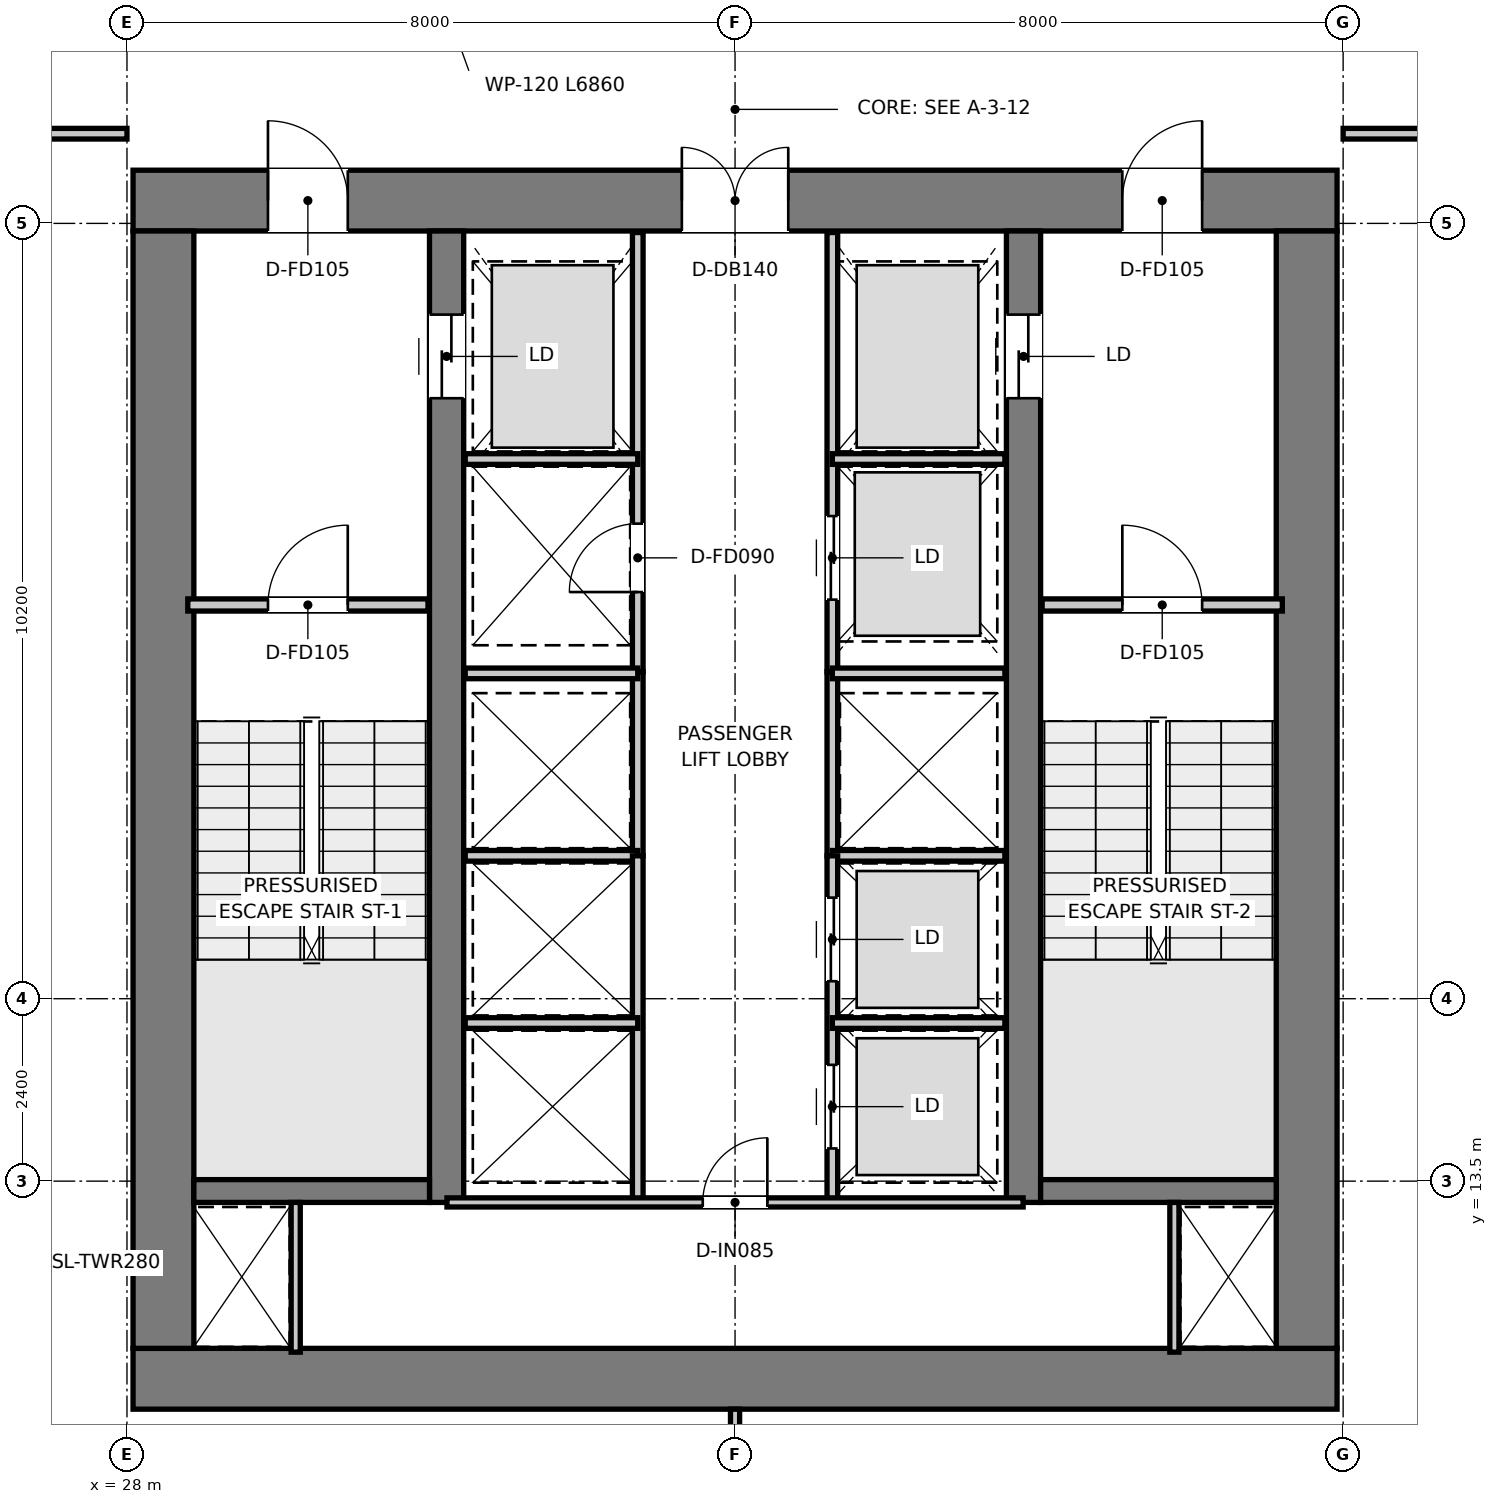
"""IFC4 building model, lengths in metres.
Left out: names, types, materials, properties, quantities, classifications, styles, units other than length and angle.
Written with IfcOpenShell. Run it as: python <this file> out.ifc"""

import sys

from ifc_helpers import new_model, si_unit, direction, frame, frame_2d, origin, place, context, subcontext, project, spatial, rectangle, extrude, element, fill, save


model = new_model("IFC4")
c1 = context("Model", 3, precision=1e-05, world=origin(), true_north=direction((0.0, 1.0)))
c2 = subcontext(c1, "Body", "Model", "MODEL_VIEW")
j1 = project(units=[si_unit("LENGTHUNIT", "METRE"), si_unit("PLANEANGLEUNIT", "RADIAN")], contexts=[c1])
p1 = place(None, origin())
s1 = spatial("IfcSite", under=j1, at=p1, CompositionType="ELEMENT")
p2 = place(p1, origin())
s2 = spatial("IfcBuilding", under=s1, at=p2, CompositionType="ELEMENT")
p3 = place(p2, frame((0.0, 0.0, 146.2)))
s3 = spatial("IfcBuildingStorey", under=s2, at=p3, CompositionType="ELEMENT", Elevation=146.2)
p4 = place(p3, frame((28.08, 10.9, 0.0), z_axis=(0.0, 0.0, 1.0), x_axis=(1.0, 0.0, 0.0)))
e1 = element("IfcWall", 1, at=p4, inside=s3, PredefinedType="SHEAR", context=c2, shape_type="SweptSolid", body=[
    extrude(rectangle(XDim=15.84, YDim=0.8, at=frame_2d((7.92, 0.0))), origin(), (0.0, 0.0, 1.0), 3.95),
])
p5 = place(p3, frame((28.08, 26.4, 0.0), z_axis=(0.0, 0.0, 1.0), x_axis=(1.0, 0.0, 0.0)))
e2 = element("IfcWall", 2, at=p5, inside=s3, PredefinedType="SHEAR", context=c2, shape_type="SweptSolid", body=[
    extrude(rectangle(XDim=15.84, YDim=0.8, at=frame_2d((7.92, 0.0))), origin(), (0.0, 0.0, 1.0), 3.95),
])
p6 = place(p5, frame((7.22, 0.0, 0.0)))
e3 = element("IfcOpeningElement", 3, at=p6, cuts=e2, PredefinedType="OPENING", context=c2, shape_type="SweptSolid", body=[
    extrude(rectangle(XDim=1.4, YDim=2.2, at=frame_2d((0.7, 1.1))), frame((0.0, 0.41, 0.0), z_axis=(0.0, -1.0, 0.0), x_axis=(1.0, 0.0, 0.0)), (0.0, 0.0, 1.0), 0.82),
])
p7 = place(p5, frame((1.775, 0.0, 0.0)))
e4 = element("IfcOpeningElement", 4, at=p7, cuts=e2, PredefinedType="OPENING", context=c2, shape_type="SweptSolid", body=[
    extrude(rectangle(XDim=1.05, YDim=2.1, at=frame_2d((0.525, 1.05))), frame((0.0, 0.41, 0.0), z_axis=(0.0, -1.0, 0.0), x_axis=(1.0, 0.0, 0.0)), (0.0, 0.0, 1.0), 0.82),
])
p8 = place(p5, frame((13.015, 0.0, 0.0)))
e5 = element("IfcOpeningElement", 5, at=p8, cuts=e2, PredefinedType="OPENING", context=c2, shape_type="SweptSolid", body=[
    extrude(rectangle(XDim=1.05, YDim=2.1, at=frame_2d((0.525, 1.05))), frame((0.0, 0.41, 0.0), z_axis=(0.0, -1.0, 0.0), x_axis=(1.0, 0.0, 0.0)), (0.0, 0.0, 1.0), 0.82),
])
for number, where, z_axis, x_axis in (
    (6, (28.48, 11.3, 0.0), (0.0, 0.0, 1.0), (0.0, 1.0, 0.0)),
    (7, (43.52, 11.3, 0.0), (0.0, 0.0, 1.0), (0.0, 1.0, 0.0)),
):
    element("IfcWall", number, at=place(p3, frame(where, z_axis=z_axis, x_axis=x_axis)), inside=s3, PredefinedType="SHEAR", context=c2, shape_type="SweptSolid", body=[
        extrude(rectangle(XDim=14.7, YDim=0.8, at=frame_2d((7.35, 0.0))), origin(), (0.0, 0.0, 1.0), 3.95),
    ])
p9 = place(p3, frame((32.205, 13.22, 0.0), z_axis=(0.0, 0.0, 1.0), x_axis=(0.0, 1.0, 0.0)))
e8 = element("IfcWall", 8, at=p9, inside=s3, PredefinedType="SHEAR", context=c2, shape_type="SweptSolid", body=[
    extrude(rectangle(XDim=12.78, YDim=0.45, at=frame_2d((6.39, 0.0))), origin(), (0.0, 0.0, 1.0), 3.95),
])
p10 = place(p9, frame((10.58, 0.0, 0.0)))
e9 = element("IfcOpeningElement", 9, at=p10, cuts=e8, PredefinedType="OPENING", context=c2, shape_type="SweptSolid", body=[
    extrude(rectangle(XDim=1.1, YDim=2.15, at=frame_2d((0.55, 1.075))), frame((0.0, 0.235, 0.0), z_axis=(0.0, -1.0, 0.0), x_axis=(1.0, 0.0, 0.0)), (0.0, 0.0, 1.0), 0.47),
])
p11 = place(p3, frame((39.795, 13.22, 0.0), z_axis=(0.0, 0.0, 1.0), x_axis=(0.0, 1.0, 0.0)))
e10 = element("IfcWall", 10, at=p11, inside=s3, PredefinedType="SHEAR", context=c2, shape_type="SweptSolid", body=[
    extrude(rectangle(XDim=12.78, YDim=0.45, at=frame_2d((6.39, 0.0))), origin(), (0.0, 0.0, 1.0), 3.95),
])
p12 = place(p11, frame((10.58, 0.0, 0.0)))
e11 = element("IfcOpeningElement", 11, at=p12, cuts=e10, PredefinedType="OPENING", context=c2, shape_type="SweptSolid", body=[
    extrude(rectangle(XDim=1.1, YDim=2.15, at=frame_2d((0.55, 1.075))), frame((0.0, 0.235, 0.0), z_axis=(0.0, -1.0, 0.0), x_axis=(1.0, 0.0, 0.0)), (0.0, 0.0, 1.0), 0.47),
])
for number, where, z_axis, x_axis in (
    (12, (28.88, 13.37, 0.0), (0.0, 0.0, 1.0), (1.0, 0.0, 0.0)),
    (13, (40.02, 13.37, 0.0), (0.0, 0.0, 1.0), (1.0, 0.0, 0.0)),
):
    element("IfcWall", number, at=place(p3, frame(where, z_axis=z_axis, x_axis=x_axis)), inside=s3, PredefinedType="SHEAR", context=c2, shape_type="SweptSolid", body=[
        extrude(rectangle(XDim=3.1, YDim=0.3, at=frame_2d((1.55, 0.0))), origin(), (0.0, 0.0, 1.0), 3.95),
    ])
p13 = place(p3, frame((28.8, 21.08, 0.0), z_axis=(0.0, 0.0, 1.0), x_axis=(1.0, 0.0, 0.0)))
e14 = element("IfcWall", 14, at=p13, inside=s3, PredefinedType="PARTITIONING", context=c2, shape_type="SweptSolid", body=[
    extrude(rectangle(XDim=3.16, YDim=0.16, at=frame_2d((1.58, 0.0))), origin(), (0.0, 0.0, 1.0), 3.67),
])
p14 = place(p13, frame((1.055, 0.0, 0.0)))
e15 = element("IfcOpeningElement", 15, at=p14, cuts=e14, PredefinedType="OPENING", context=c2, shape_type="SweptSolid", body=[
    extrude(rectangle(XDim=1.05, YDim=2.1, at=frame_2d((0.525, 1.05))), frame((0.0, 0.09, 0.0), z_axis=(0.0, -1.0, 0.0), x_axis=(1.0, 0.0, 0.0)), (0.0, 0.0, 1.0), 0.18),
])
p15 = place(p3, frame((40.04, 21.08, 0.0), z_axis=(0.0, 0.0, 1.0), x_axis=(1.0, 0.0, 0.0)))
e16 = element("IfcWall", 16, at=p15, inside=s3, PredefinedType="PARTITIONING", context=c2, shape_type="SweptSolid", body=[
    extrude(rectangle(XDim=3.16, YDim=0.16, at=frame_2d((1.58, 0.0))), origin(), (0.0, 0.0, 1.0), 3.67),
])
p16 = place(p15, frame((1.055, 0.0, 0.0)))
e17 = element("IfcOpeningElement", 17, at=p16, cuts=e16, PredefinedType="OPENING", context=c2, shape_type="SweptSolid", body=[
    extrude(rectangle(XDim=1.05, YDim=2.1, at=frame_2d((0.525, 1.05))), frame((0.0, 0.09, 0.0), z_axis=(0.0, -1.0, 0.0), x_axis=(1.0, 0.0, 0.0)), (0.0, 0.0, 1.0), 0.18),
])
p17 = place(p3, frame((34.72, 20.2, 0.0), z_axis=(0.0, 0.0, 1.0), x_axis=(0.0, 1.0, 0.0)))
e18 = element("IfcWall", 18, at=p17, inside=s3, PredefinedType="PARTITIONING", context=c2, shape_type="SweptSolid", body=[
    extrude(rectangle(XDim=5.78, YDim=0.14, at=frame_2d((2.89, 0.0))), origin(), (0.0, 0.0, 1.0), 2.67),
])
p18 = place(p17, frame((1.05, 0.0, 0.0)))
e19 = element("IfcOpeningElement", 19, at=p18, cuts=e18, PredefinedType="OPENING", context=c2, shape_type="SweptSolid", body=[
    extrude(rectangle(XDim=0.9, YDim=2.1, at=frame_2d((0.45, 1.05))), frame((0.0, 0.08, 0.0), z_axis=(0.0, -1.0, 0.0), x_axis=(1.0, 0.0, 0.0)), (0.0, 0.0, 1.0), 0.16),
])
p19 = place(p3, frame((37.28, 20.2, 0.0), z_axis=(0.0, 0.0, 1.0), x_axis=(0.0, 1.0, 0.0)))
e20 = element("IfcWall", 20, at=p19, inside=s3, PredefinedType="PARTITIONING", context=c2, shape_type="SweptSolid", body=[
    extrude(rectangle(XDim=5.78, YDim=0.14, at=frame_2d((2.89, 0.0))), origin(), (0.0, 0.0, 1.0), 2.67),
])
p20 = place(p19, frame((0.95, 0.0, 0.0)))
e21 = element("IfcOpeningElement", 21, at=p20, cuts=e20, PredefinedType="OPENING", context=c2, shape_type="SweptSolid", body=[
    extrude(rectangle(XDim=1.1, YDim=2.15, at=frame_2d((0.55, 1.075))), frame((0.0, 0.08, 0.0), z_axis=(0.0, -1.0, 0.0), x_axis=(1.0, 0.0, 0.0)), (0.0, 0.0, 1.0), 0.16),
])
for number, where, z_axis, x_axis in (
    (22, (32.45, 23.0, 0.0), (0.0, 0.0, 1.0), (1.0, 0.0, 0.0)),
    (23, (37.28, 23.0, 0.0), (0.0, 0.0, 1.0), (1.0, 0.0, 0.0)),
):
    element("IfcWall", number, at=place(p3, frame(where, z_axis=z_axis, x_axis=x_axis)), inside=s3, PredefinedType="PARTITIONING", context=c2, shape_type="SweptSolid", body=[
        extrude(rectangle(XDim=2.27, YDim=0.14, at=frame_2d((1.135, 0.0))), origin(), (0.0, 0.0, 1.0), 2.67),
    ])
for number, where, z_axis, x_axis in (
    (24, (34.72, 17.78, 0.0), (0.0, 0.0, 1.0), (0.0, 1.0, 0.0)),
    (25, (37.28, 17.78, 0.0), (0.0, 0.0, 1.0), (0.0, 1.0, 0.0)),
):
    element("IfcWall", number, at=place(p3, frame(where, z_axis=z_axis, x_axis=x_axis)), inside=s3, PredefinedType="PARTITIONING", context=c2, shape_type="SweptSolid", body=[
        extrude(rectangle(XDim=2.42, YDim=0.14, at=frame_2d((1.21, 0.0))), origin(), (0.0, 0.0, 1.0), 3.67),
    ])
for number, where, z_axis, x_axis in (
    (26, (32.45, 17.78, 0.0), (0.0, 0.0, 1.0), (1.0, 0.0, 0.0)),
    (27, (32.45, 20.18, 0.0), (0.0, 0.0, 1.0), (1.0, 0.0, 0.0)),
    (28, (37.28, 17.78, 0.0), (0.0, 0.0, 1.0), (1.0, 0.0, 0.0)),
    (29, (37.28, 20.18, 0.0), (0.0, 0.0, 1.0), (1.0, 0.0, 0.0)),
):
    element("IfcWall", number, at=place(p3, frame(where, z_axis=z_axis, x_axis=x_axis)), inside=s3, PredefinedType="PARTITIONING", context=c2, shape_type="SweptSolid", body=[
        extrude(rectangle(XDim=2.27, YDim=0.14, at=frame_2d((1.135, 0.0))), origin(), (0.0, 0.0, 1.0), 3.67),
    ])
p21 = place(p3, frame((34.72, 13.22, 0.0), z_axis=(0.0, 0.0, 1.0), x_axis=(0.0, 1.0, 0.0)))
e30 = element("IfcWall", 30, at=p21, inside=s3, PredefinedType="PARTITIONING", context=c2, shape_type="SweptSolid", body=[
    extrude(rectangle(XDim=4.56, YDim=0.14, at=frame_2d((2.28, 0.0))), origin(), (0.0, 0.0, 1.0), 3.67),
])
p22 = place(p3, frame((32.45, 15.58, 0.0), z_axis=(0.0, 0.0, 1.0), x_axis=(1.0, 0.0, 0.0)))
e31 = element("IfcWall", 31, at=p22, inside=s3, PredefinedType="PARTITIONING", context=c2, shape_type="SweptSolid", body=[
    extrude(rectangle(XDim=2.27, YDim=0.14, at=frame_2d((1.135, 0.0))), origin(), (0.0, 0.0, 1.0), 3.67),
])
p23 = place(p3, frame((37.28, 13.22, 0.0), z_axis=(0.0, 0.0, 1.0), x_axis=(0.0, 1.0, 0.0)))
e32 = element("IfcWall", 32, at=p23, inside=s3, PredefinedType="PARTITIONING", context=c2, shape_type="SweptSolid", body=[
    extrude(rectangle(XDim=4.56, YDim=0.14, at=frame_2d((2.28, 0.0))), origin(), (0.0, 0.0, 1.0), 3.67),
])
p24 = place(p23, frame((0.71, 0.0, 0.0)))
e33 = element("IfcOpeningElement", 33, at=p24, cuts=e32, PredefinedType="OPENING", context=c2, shape_type="SweptSolid", body=[
    extrude(rectangle(XDim=1.1, YDim=2.15, at=frame_2d((0.55, 1.075))), frame((0.0, 0.08, 0.0), z_axis=(0.0, -1.0, 0.0), x_axis=(1.0, 0.0, 0.0)), (0.0, 0.0, 1.0), 0.16),
])
p25 = place(p23, frame((2.91, 0.0, 0.0)))
e34 = element("IfcOpeningElement", 34, at=p25, cuts=e32, PredefinedType="OPENING", context=c2, shape_type="SweptSolid", body=[
    extrude(rectangle(XDim=1.1, YDim=2.15, at=frame_2d((0.55, 1.075))), frame((0.0, 0.08, 0.0), z_axis=(0.0, -1.0, 0.0), x_axis=(1.0, 0.0, 0.0)), (0.0, 0.0, 1.0), 0.16),
])
p26 = place(p3, frame((37.28, 15.58, 0.0), z_axis=(0.0, 0.0, 1.0), x_axis=(1.0, 0.0, 0.0)))
e35 = element("IfcWall", 35, at=p26, inside=s3, PredefinedType="PARTITIONING", context=c2, shape_type="SweptSolid", body=[
    extrude(rectangle(XDim=2.27, YDim=0.14, at=frame_2d((1.135, 0.0))), origin(), (0.0, 0.0, 1.0), 3.67),
])
for number, where, z_axis, x_axis in (
    (36, (30.22, 11.25, 0.0), (0.0, 0.0, 1.0), (0.0, 1.0, 0.0)),
    (37, (41.78, 11.25, 0.0), (0.0, 0.0, 1.0), (0.0, 1.0, 0.0)),
):
    element("IfcWall", number, at=place(p3, frame(where, z_axis=z_axis, x_axis=x_axis)), inside=s3, PredefinedType="PARTITIONING", context=c2, shape_type="SweptSolid", body=[
        extrude(rectangle(XDim=1.97, YDim=0.12, at=frame_2d((0.985, 0.0))), origin(), (0.0, 0.0, 1.0), 3.67),
    ])
p27 = place(p3, frame((32.21, 13.22, 0.0), z_axis=(0.0, 0.0, 1.0), x_axis=(1.0, 0.0, 0.0)))
e38 = element("IfcWall", 38, at=p27, inside=s3, PredefinedType="PARTITIONING", context=c2, shape_type="SweptSolid", body=[
    extrude(rectangle(XDim=7.58, YDim=0.12, at=frame_2d((3.79, 0.0))), origin(), (0.0, 0.0, 1.0), 3.67),
])
p28 = place(p27, frame((3.365, 0.0, 0.0)))
e39 = element("IfcOpeningElement", 39, at=p28, cuts=e38, PredefinedType="OPENING", context=c2, shape_type="SweptSolid", body=[
    extrude(rectangle(XDim=0.85, YDim=2.1, at=frame_2d((0.425, 1.05))), frame((0.0, 0.07, 0.0), z_axis=(0.0, -1.0, 0.0), x_axis=(1.0, 0.0, 0.0)), (0.0, 0.0, 1.0), 0.14),
])
p29 = place(p3, frame((12.113, 27.28, 0.0), z_axis=(0.0, 0.0, 1.0), x_axis=(1.0, 0.0, 0.0)))
e40 = element("IfcWall", 40, at=p29, inside=s3, PredefinedType="PARTITIONING", context=c2, shape_type="SweptSolid", body=[
    extrude(rectangle(XDim=15.887, YDim=0.14, at=frame_2d((7.944, 0.0))), origin(), (0.0, 0.0, 1.0), 3.03),
])
p30 = place(p29, frame((4.105, 0.0, 0.0)))
e41 = element("IfcOpeningElement", 41, at=p30, cuts=e40, PredefinedType="OPENING", context=c2, shape_type="SweptSolid", body=[
    extrude(rectangle(XDim=0.9, YDim=2.1, at=frame_2d((0.45, 1.05))), frame((0.0, 0.08, 0.0), z_axis=(0.0, -1.0, 0.0), x_axis=(1.0, 0.0, 0.0)), (0.0, 0.0, 1.0), 0.16),
])
p31 = place(p29, frame((12.887, 0.0, 0.0)))
e42 = element("IfcOpeningElement", 42, at=p31, cuts=e40, PredefinedType="OPENING", context=c2, shape_type="SweptSolid", body=[
    extrude(rectangle(XDim=0.9, YDim=2.1, at=frame_2d((0.45, 1.05))), frame((0.0, 0.08, 0.0), z_axis=(0.0, -1.0, 0.0), x_axis=(1.0, 0.0, 0.0)), (0.0, 0.0, 1.0), 0.16),
])
p32 = place(p3, frame((44.0, 27.28, 0.0), z_axis=(0.0, 0.0, 1.0), x_axis=(1.0, 0.0, 0.0)))
e43 = element("IfcWall", 43, at=p32, inside=s3, PredefinedType="PARTITIONING", context=c2, shape_type="SweptSolid", body=[
    extrude(rectangle(XDim=16.441, YDim=0.14, at=frame_2d((8.22, 0.0))), origin(), (0.0, 0.0, 1.0), 3.03),
])
p33 = place(p32, frame((8.932, 0.0, 0.0)))
e44 = element("IfcOpeningElement", 44, at=p33, cuts=e43, PredefinedType="OPENING", context=c2, shape_type="SweptSolid", body=[
    extrude(rectangle(XDim=0.9, YDim=2.1, at=frame_2d((0.45, 1.05))), frame((0.0, 0.08, 0.0), z_axis=(0.0, -1.0, 0.0), x_axis=(1.0, 0.0, 0.0)), (0.0, 0.0, 1.0), 0.16),
])
p34 = place(p3, frame((36.0, 2.536, 0.0), z_axis=(0.0, 0.0, 1.0), x_axis=(0.0, 1.0, 0.0)))
e45 = element("IfcWall", 45, at=p34, inside=s3, PredefinedType="PARTITIONING", context=c2, shape_type="SweptSolid", body=[
    extrude(rectangle(XDim=7.964, YDim=0.12, at=frame_2d((3.982, 0.0))), origin(), (0.0, 0.0, 1.0), 3.67),
])
p35 = place(p14, origin())
e46 = element("IfcDoor", 46, at=p35, inside=s3, OperationType="SINGLE_SWING_RIGHT", PredefinedType="DOOR", context=c2, shape_type="SweptSolid", body=[
    extrude(rectangle(XDim=1.05, YDim=2.1, at=frame_2d((0.525, 1.05))), frame((0.0, 0.025, 0.0), z_axis=(0.0, -1.0, 0.0), x_axis=(1.0, 0.0, 0.0)), (0.0, 0.0, 1.0), 0.05),
])
fill(e15, e46)
p36 = place(p16, origin())
e47 = element("IfcDoor", 47, at=p36, inside=s3, OperationType="SINGLE_SWING_LEFT", PredefinedType="DOOR", context=c2, shape_type="SweptSolid", body=[
    extrude(rectangle(XDim=1.05, YDim=2.1, at=frame_2d((0.525, 1.05))), frame((0.0, 0.025, 0.0), z_axis=(0.0, -1.0, 0.0), x_axis=(1.0, 0.0, 0.0)), (0.0, 0.0, 1.0), 0.05),
])
fill(e17, e47)
p37 = place(p6, origin())
e48 = element("IfcDoor", 48, at=p37, inside=s3, OperationType="DOUBLE_DOOR_SINGLE_SWING", PredefinedType="DOOR", context=c2, shape_type="SweptSolid", body=[
    extrude(rectangle(XDim=1.4, YDim=2.2, at=frame_2d((0.7, 1.1))), frame((0.0, 0.025, 0.0), z_axis=(0.0, -1.0, 0.0), x_axis=(1.0, 0.0, 0.0)), (0.0, 0.0, 1.0), 0.05),
])
fill(e3, e48)
p38 = place(p7, origin())
e49 = element("IfcDoor", 49, at=p38, inside=s3, OperationType="SINGLE_SWING_LEFT", PredefinedType="DOOR", context=c2, shape_type="SweptSolid", body=[
    extrude(rectangle(XDim=1.05, YDim=2.1, at=frame_2d((0.525, 1.05))), frame((0.0, 0.025, 0.0), z_axis=(0.0, -1.0, 0.0), x_axis=(1.0, 0.0, 0.0)), (0.0, 0.0, 1.0), 0.05),
])
fill(e4, e49)
p39 = place(p8, origin())
e50 = element("IfcDoor", 50, at=p39, inside=s3, OperationType="SINGLE_SWING_RIGHT", PredefinedType="DOOR", context=c2, shape_type="SweptSolid", body=[
    extrude(rectangle(XDim=1.05, YDim=2.1, at=frame_2d((0.525, 1.05))), frame((0.0, 0.025, 0.0), z_axis=(0.0, -1.0, 0.0), x_axis=(1.0, 0.0, 0.0)), (0.0, 0.0, 1.0), 0.05),
])
fill(e5, e50)
p40 = place(p10, origin())
e51 = element("IfcDoor", 51, at=p40, inside=s3, OperationType="DOUBLE_DOOR_SLIDING", PredefinedType="DOOR", context=c2, shape_type="SweptSolid", body=[
    extrude(rectangle(XDim=1.1, YDim=2.15, at=frame_2d((0.55, 1.075))), frame((0.0, 0.025, 0.0), z_axis=(0.0, -1.0, 0.0), x_axis=(1.0, 0.0, 0.0)), (0.0, 0.0, 1.0), 0.05),
])
fill(e9, e51)
p41 = place(p12, origin())
e52 = element("IfcDoor", 52, at=p41, inside=s3, OperationType="DOUBLE_DOOR_SLIDING", PredefinedType="DOOR", context=c2, shape_type="SweptSolid", body=[
    extrude(rectangle(XDim=1.1, YDim=2.15, at=frame_2d((0.55, 1.075))), frame((0.0, 0.025, 0.0), z_axis=(0.0, -1.0, 0.0), x_axis=(1.0, 0.0, 0.0)), (0.0, 0.0, 1.0), 0.05),
])
fill(e11, e52)
p42 = place(p18, origin())
e53 = element("IfcDoor", 53, at=p42, inside=s3, OperationType="SINGLE_SWING_LEFT", PredefinedType="DOOR", context=c2, shape_type="SweptSolid", body=[
    extrude(rectangle(XDim=0.9, YDim=2.1, at=frame_2d((0.45, 1.05))), frame((0.0, 0.025, 0.0), z_axis=(0.0, -1.0, 0.0), x_axis=(1.0, 0.0, 0.0)), (0.0, 0.0, 1.0), 0.05),
])
fill(e19, e53)
p43 = place(p20, origin())
e54 = element("IfcDoor", 54, at=p43, inside=s3, OperationType="DOUBLE_DOOR_SLIDING", PredefinedType="DOOR", context=c2, shape_type="SweptSolid", body=[
    extrude(rectangle(XDim=1.1, YDim=2.15, at=frame_2d((0.55, 1.075))), frame((0.0, 0.025, 0.0), z_axis=(0.0, -1.0, 0.0), x_axis=(1.0, 0.0, 0.0)), (0.0, 0.0, 1.0), 0.05),
])
fill(e21, e54)
p44 = place(p24, origin())
e55 = element("IfcDoor", 55, at=p44, inside=s3, OperationType="DOUBLE_DOOR_SLIDING", PredefinedType="DOOR", context=c2, shape_type="SweptSolid", body=[
    extrude(rectangle(XDim=1.1, YDim=2.15, at=frame_2d((0.55, 1.075))), frame((0.0, 0.025, 0.0), z_axis=(0.0, -1.0, 0.0), x_axis=(1.0, 0.0, 0.0)), (0.0, 0.0, 1.0), 0.05),
])
fill(e33, e55)
p45 = place(p25, origin())
e56 = element("IfcDoor", 56, at=p45, inside=s3, OperationType="DOUBLE_DOOR_SLIDING", PredefinedType="DOOR", context=c2, shape_type="SweptSolid", body=[
    extrude(rectangle(XDim=1.1, YDim=2.15, at=frame_2d((0.55, 1.075))), frame((0.0, 0.025, 0.0), z_axis=(0.0, -1.0, 0.0), x_axis=(1.0, 0.0, 0.0)), (0.0, 0.0, 1.0), 0.05),
])
fill(e34, e56)
p46 = place(p28, origin())
e57 = element("IfcDoor", 57, at=p46, inside=s3, OperationType="SINGLE_SWING_RIGHT", PredefinedType="DOOR", context=c2, shape_type="SweptSolid", body=[
    extrude(rectangle(XDim=0.85, YDim=2.1, at=frame_2d((0.425, 1.05))), frame((0.0, 0.025, 0.0), z_axis=(0.0, -1.0, 0.0), x_axis=(1.0, 0.0, 0.0)), (0.0, 0.0, 1.0), 0.05),
])
fill(e39, e57)
save(model, sys.argv[1])
